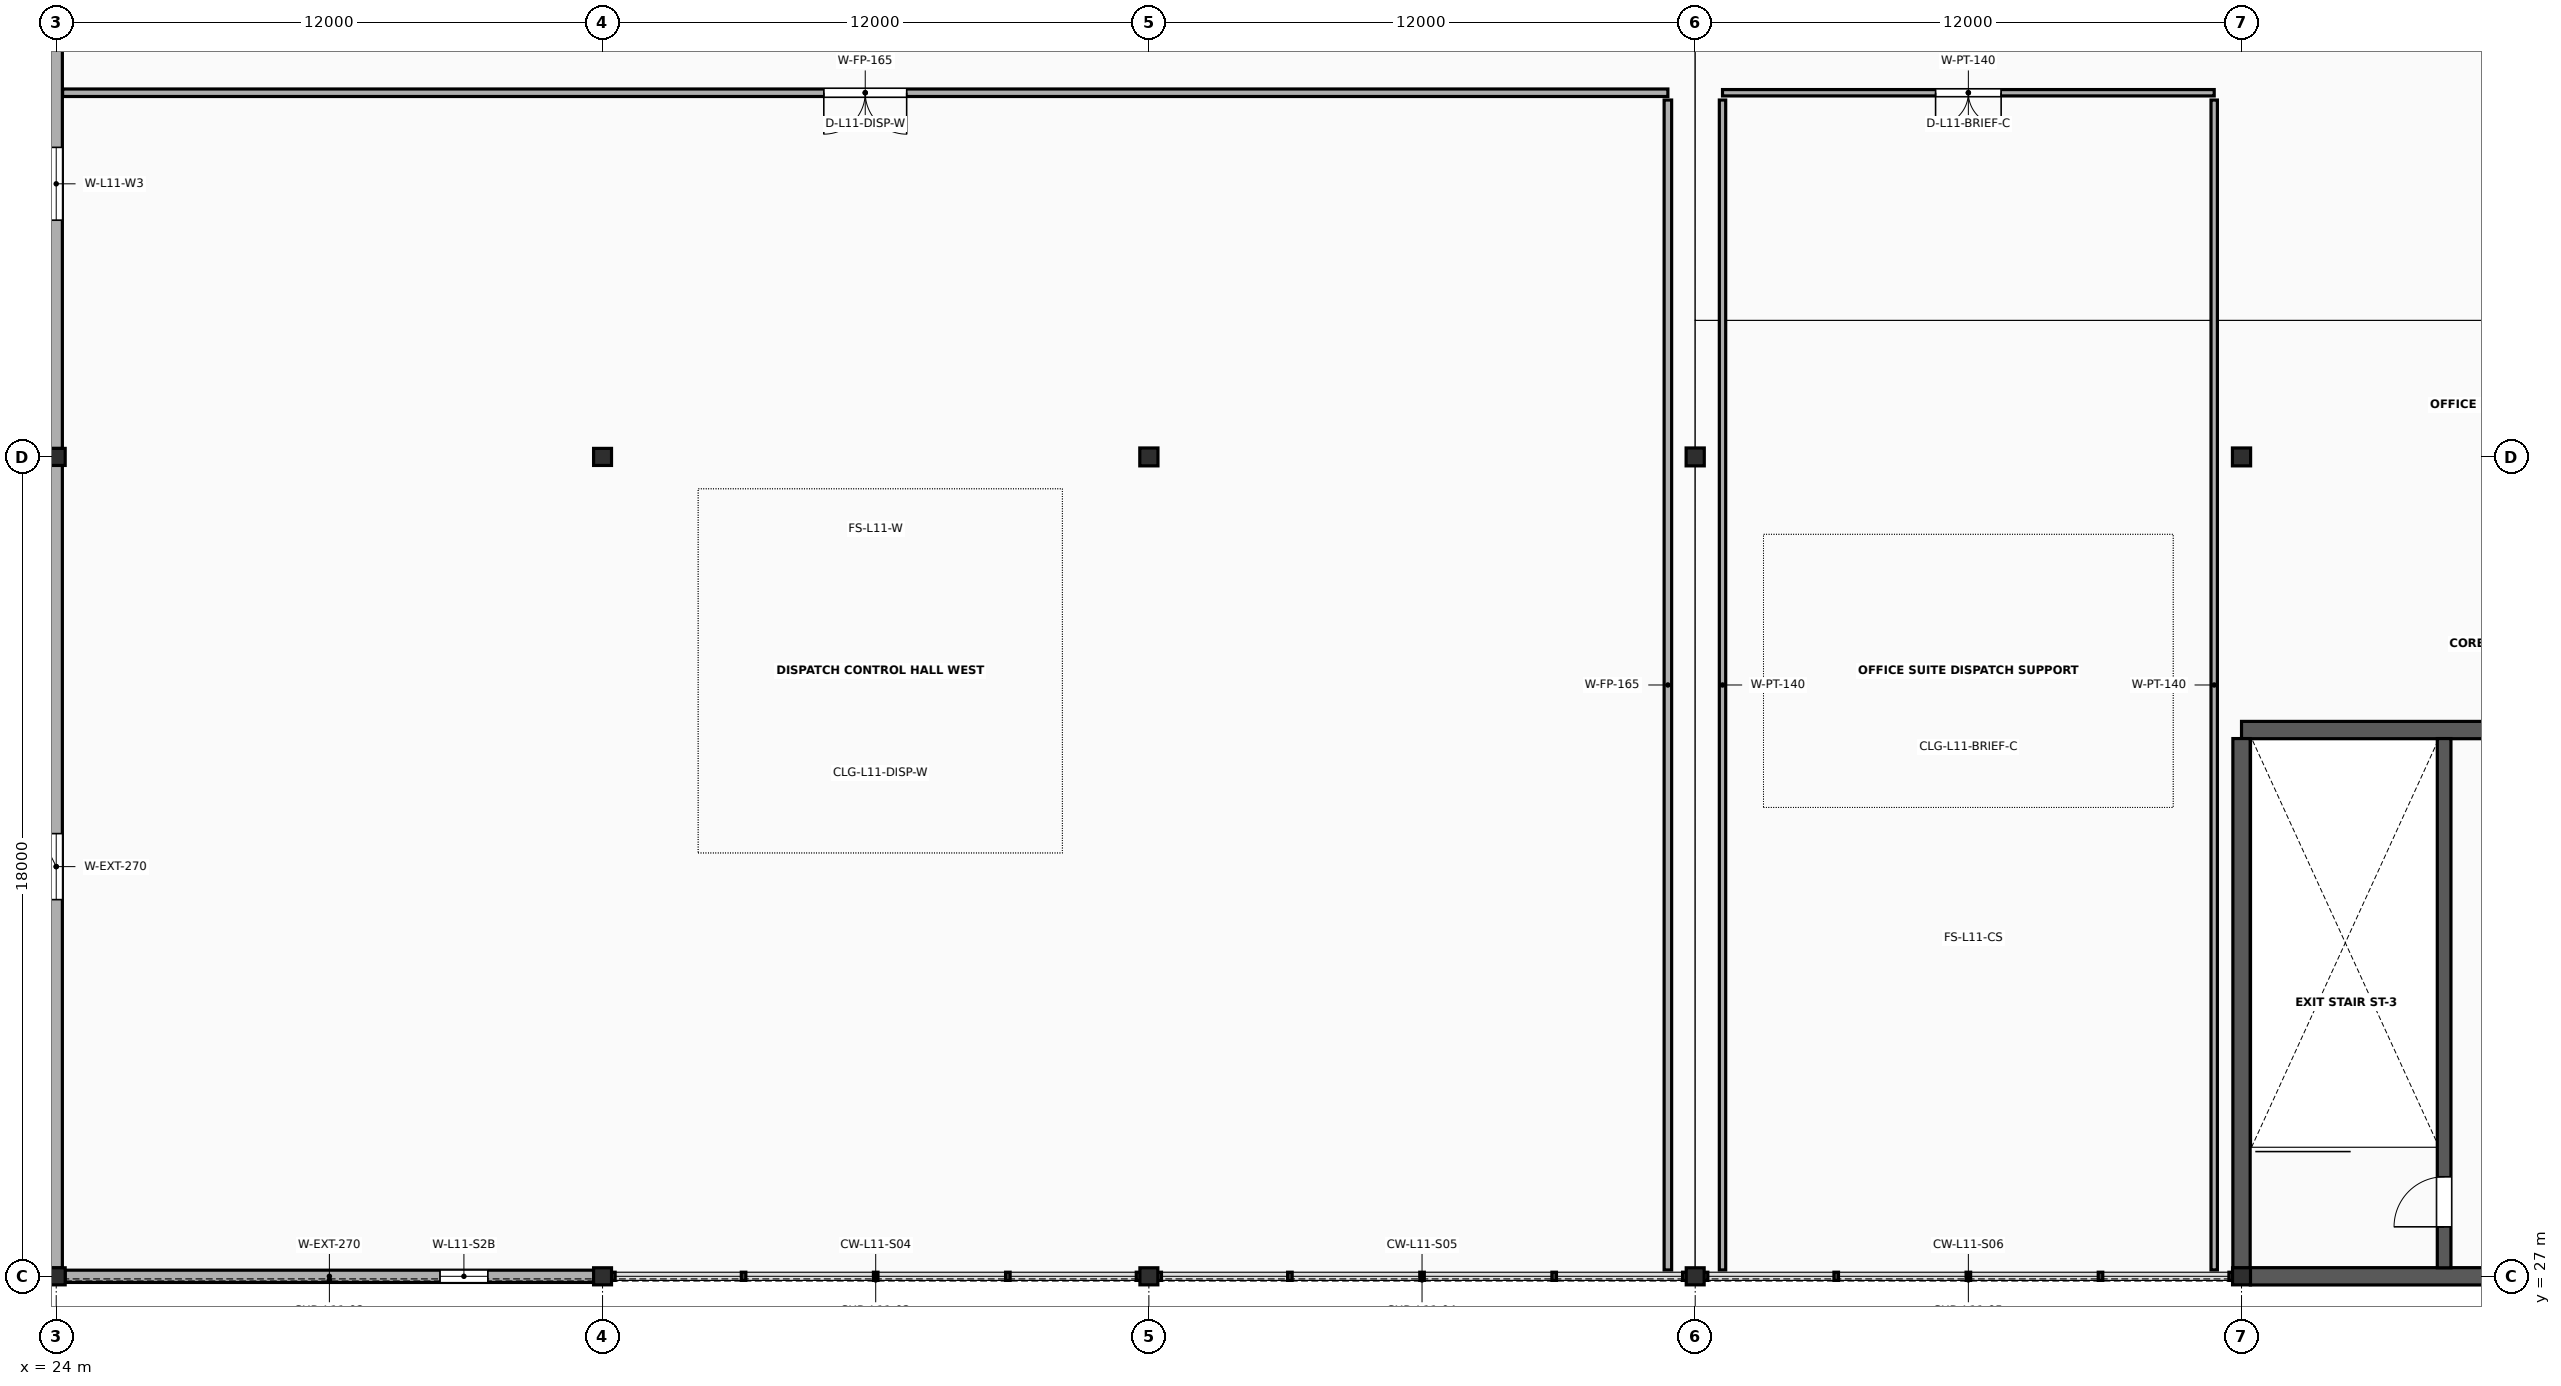
"""IFC4 building model, lengths in metres.
Left out: names, types, materials, properties, quantities, classifications, styles, units other than length and angle.
Written with IfcOpenShell. Run it as: python <this file> out.ifc"""

import sys

from ifc_helpers import new_model, si_unit, direction, frame, frame_2d, origin, origin_2d, place, context, subcontext, project, spatial, rectangle, i_section, extrude, element, fill, save


model = new_model("IFC4")
c1 = context("Model", 3, precision=1e-05, world=origin(), true_north=direction((0.0, 1.0)))
c2 = subcontext(c1, "Body", "Model", "MODEL_VIEW")
j1 = project(units=[si_unit("LENGTHUNIT", "METRE"), si_unit("PLANEANGLEUNIT", "RADIAN")], contexts=[c1])
p1 = place(None, origin())
s1 = spatial("IfcSite", under=j1, at=p1, CompositionType="ELEMENT")
p2 = place(p1, origin())
s2 = spatial("IfcBuilding", under=s1, at=p2, CompositionType="ELEMENT")
p3 = place(p2, frame((0.0, 0.0, 45.6)))
s3 = spatial("IfcBuildingStorey", under=s2, at=p3, CompositionType="ELEMENT", Elevation=45.6)
for number, where, z_axis, x_axis in (
    (1, (24.0, 27.0, 0.0), (0.0, 0.0, 1.0), (1.0, 0.0, 0.0)),
    (2, (24.0, 45.0, 0.0), (0.0, 0.0, 1.0), (1.0, 0.0, 0.0)),
    (3, (36.0, 27.0, 0.0), (0.0, 0.0, 1.0), (1.0, 0.0, 0.0)),
    (4, (36.0, 45.0, 0.0), (0.0, 0.0, 1.0), (1.0, 0.0, 0.0)),
    (5, (48.0, 27.0, 0.0), (0.0, 0.0, 1.0), (1.0, 0.0, 0.0)),
):
    element("IfcColumn", number, at=place(p3, frame(where, z_axis=z_axis, x_axis=x_axis)), inside=s3, PredefinedType="COLUMN", context=c2, shape_type="SweptSolid", body=[
        extrude(i_section(OverallWidth=0.394, OverallDepth=0.375, WebThickness=0.017, FlangeThickness=0.028, FilletRadius=0.018, at=origin_2d()), origin(), (0.0, 0.0, 1.0), 4.0),
    ])
p4 = place(p3, frame((48.0, 45.0, 0.0), z_axis=(0.0, 0.0, 1.0), x_axis=(1.0, 0.0, 0.0)))
e6 = element("IfcColumn", 6, at=p4, inside=s3, PredefinedType="COLUMN", context=c2, shape_type="SweptSolid", body=[
    extrude(i_section(OverallWidth=0.399, OverallDepth=0.393, WebThickness=0.023, FlangeThickness=0.037, FilletRadius=0.018, at=origin_2d()), origin(), (0.0, 0.0, 1.0), 4.0),
])
p5 = place(p3, frame((60.0, 27.0, 0.0), z_axis=(0.0, 0.0, 1.0), x_axis=(1.0, 0.0, 0.0)))
e7 = element("IfcColumn", 7, at=p5, inside=s3, PredefinedType="COLUMN", context=c2, shape_type="SweptSolid", body=[
    extrude(i_section(OverallWidth=0.394, OverallDepth=0.375, WebThickness=0.017, FlangeThickness=0.028, FilletRadius=0.018, at=origin_2d()), origin(), (0.0, 0.0, 1.0), 4.0),
])
p6 = place(p3, frame((60.0, 45.0, 0.0), z_axis=(0.0, 0.0, 1.0), x_axis=(1.0, 0.0, 0.0)))
e8 = element("IfcColumn", 8, at=p6, inside=s3, PredefinedType="COLUMN", context=c2, shape_type="SweptSolid", body=[
    extrude(i_section(OverallWidth=0.399, OverallDepth=0.393, WebThickness=0.023, FlangeThickness=0.037, FilletRadius=0.018, at=origin_2d()), origin(), (0.0, 0.0, 1.0), 4.0),
])
p7 = place(p3, frame((72.0, 27.0, 0.0), z_axis=(0.0, 0.0, 1.0), x_axis=(1.0, 0.0, 0.0)))
e9 = element("IfcColumn", 9, at=p7, inside=s3, PredefinedType="COLUMN", context=c2, shape_type="SweptSolid", body=[
    extrude(i_section(OverallWidth=0.394, OverallDepth=0.375, WebThickness=0.017, FlangeThickness=0.028, FilletRadius=0.018, at=origin_2d()), origin(), (0.0, 0.0, 1.0), 4.0),
])
p8 = place(p3, frame((72.0, 45.0, 0.0), z_axis=(0.0, 0.0, 1.0), x_axis=(1.0, 0.0, 0.0)))
e10 = element("IfcColumn", 10, at=p8, inside=s3, PredefinedType="COLUMN", context=c2, shape_type="SweptSolid", body=[
    extrude(i_section(OverallWidth=0.399, OverallDepth=0.393, WebThickness=0.023, FlangeThickness=0.037, FilletRadius=0.018, at=origin_2d()), origin(), (0.0, 0.0, 1.0), 4.0),
])
p9 = place(p3, frame((72.194, 27.0, 0.0), z_axis=(0.0, 0.0, 1.0), x_axis=(1.0, 0.0, 0.0)))
e11 = element("IfcWall", 11, at=p9, inside=s3, PredefinedType="SHEAR", context=c2, shape_type="SweptSolid", body=[
    extrude(rectangle(XDim=11.612, YDim=0.38, at=frame_2d((5.806, 0.0))), origin(), (0.0, 0.0, 1.0), 3.783),
])
p10 = place(p3, frame((72.0, 39.0, 0.0), z_axis=(0.0, 0.0, 1.0), x_axis=(1.0, 0.0, 0.0)))
e12 = element("IfcWall", 12, at=p10, inside=s3, PredefinedType="SHEAR", context=c2, shape_type="SweptSolid", body=[
    extrude(rectangle(XDim=12.0, YDim=0.38, at=frame_2d((6.0, 0.0))), origin(), (0.0, 0.0, 1.0), 3.783),
])
p11 = place(p10, frame((7.45, 0.0, 0.0)))
e13 = element("IfcOpeningElement", 13, at=p11, cuts=e12, PredefinedType="OPENING", context=c2, shape_type="SweptSolid", body=[
    extrude(rectangle(XDim=1.5, YDim=2.25, at=frame_2d((0.75, 1.125))), frame((0.0, 0.205, 0.0), z_axis=(0.0, -1.0, 0.0), x_axis=(1.0, 0.0, 0.0)), (0.0, 0.0, 1.0), 0.41),
])
p12 = place(p3, frame((72.0, 27.185, 0.0), z_axis=(0.0, 0.0, 1.0), x_axis=(0.0, 1.0, 0.0)))
e14 = element("IfcWall", 14, at=p12, inside=s3, PredefinedType="SHEAR", context=c2, shape_type="SweptSolid", body=[
    extrude(rectangle(XDim=11.628, YDim=0.38, at=frame_2d((5.814, 0.0))), origin(), (0.0, 0.0, 1.0), 3.783),
])
p13 = place(p3, frame((76.45, 27.187, 0.0), z_axis=(0.0, 0.0, 1.0), x_axis=(0.0, 1.0, 0.0)))
e15 = element("IfcWall", 15, at=p13, inside=s3, PredefinedType="SHEAR", context=c2, shape_type="SweptSolid", body=[
    extrude(rectangle(XDim=11.626, YDim=0.3, at=frame_2d((5.813, 0.0))), origin(), (0.0, 0.0, 1.0), 3.783),
])
p14 = place(p13, frame((0.9, 0.0, 0.0)))
e16 = element("IfcOpeningElement", 16, at=p14, cuts=e15, PredefinedType="OPENING", context=c2, shape_type="SweptSolid", body=[
    extrude(rectangle(XDim=1.1, YDim=2.2, at=frame_2d((0.55, 1.1))), frame((0.0, 0.165, 0.0), z_axis=(0.0, -1.0, 0.0), x_axis=(1.0, 0.0, 0.0)), (0.0, 0.0, 1.0), 0.33),
])
p15 = place(p3, frame((24.195, 27.0, 0.0), z_axis=(0.0, 0.0, 1.0), x_axis=(1.0, 0.0, 0.0)))
e17 = element("IfcWall", 17, at=p15, inside=s3, PredefinedType="SOLIDWALL", context=c2, shape_type="SweptSolid", body=[
    extrude(rectangle(XDim=11.61, YDim=0.27, at=frame_2d((5.805, 0.0))), origin(), (0.0, 0.0, 1.0), 3.236),
])
p16 = place(p15, frame((8.235, 0.0, 0.78)))
e18 = element("IfcOpeningElement", 18, at=p16, cuts=e17, PredefinedType="OPENING", context=c2, shape_type="SweptSolid", body=[
    extrude(rectangle(XDim=1.05, YDim=1.25, at=frame_2d((0.525, 0.625))), frame((0.0, 0.15, 0.0), z_axis=(0.0, -1.0, 0.0), x_axis=(1.0, 0.0, 0.0)), (0.0, 0.0, 1.0), 0.3),
])
p17 = place(p3, frame((24.0, 27.186, 0.0), z_axis=(0.0, 0.0, 1.0), x_axis=(0.0, 1.0, 0.0)))
e19 = element("IfcWall", 19, at=p17, inside=s3, PredefinedType="SOLIDWALL", context=c2, shape_type="SweptSolid", body=[
    extrude(rectangle(XDim=17.629, YDim=0.27, at=frame_2d((8.814, 0.0))), origin(), (0.0, 0.0, 1.0), 3.236),
])
p18 = place(p17, frame((8.09, 0.0, 0.78)))
e20 = element("IfcOpeningElement", 20, at=p18, cuts=e19, PredefinedType="OPENING", context=c2, shape_type="SweptSolid", body=[
    extrude(rectangle(XDim=1.45, YDim=1.25, at=frame_2d((0.725, 0.625))), frame((0.0, 0.15, 0.0), z_axis=(0.0, -1.0, 0.0), x_axis=(1.0, 0.0, 0.0)), (0.0, 0.0, 1.0), 0.3),
])
p19 = place(p3, frame((24.0, 45.186, 0.0), z_axis=(0.0, 0.0, 1.0), x_axis=(0.0, 1.0, 0.0)))
e21 = element("IfcWall", 21, at=p19, inside=s3, PredefinedType="SOLIDWALL", context=c2, shape_type="SweptSolid", body=[
    extrude(rectangle(XDim=11.629, YDim=0.27, at=frame_2d((5.814, 0.0))), origin(), (0.0, 0.0, 1.0), 3.236),
])
p20 = place(p19, frame((5.014, 0.0, 0.78)))
e22 = element("IfcOpeningElement", 22, at=p20, cuts=e21, PredefinedType="OPENING", context=c2, shape_type="SweptSolid", body=[
    extrude(rectangle(XDim=1.6, YDim=1.25, at=frame_2d((0.8, 0.625))), frame((0.0, 0.15, 0.0), z_axis=(0.0, -1.0, 0.0), x_axis=(1.0, 0.0, 0.0)), (0.0, 0.0, 1.0), 0.3),
])
p21 = place(p3, frame((24.14, 53.0, 0.0), z_axis=(0.0, 0.0, 1.0), x_axis=(1.0, 0.0, 0.0)))
e23 = element("IfcWall", 23, at=p21, inside=s3, PredefinedType="PARTITIONING", context=c2, shape_type="SweptSolid", body=[
    extrude(rectangle(XDim=35.26, YDim=0.165, at=frame_2d((17.63, 0.0))), origin(), (0.0, 0.0, 1.0), 2.88),
])
p22 = place(p21, frame((16.72, 0.0, 0.0)))
e24 = element("IfcOpeningElement", 24, at=p22, cuts=e23, PredefinedType="OPENING", context=c2, shape_type="SweptSolid", body=[
    extrude(rectangle(XDim=1.82, YDim=2.36, at=frame_2d((0.91, 1.18))), frame((0.0, 0.097, 0.0), z_axis=(0.0, -1.0, 0.0), x_axis=(1.0, 0.0, 0.0)), (0.0, 0.0, 1.0), 0.195),
])
p23 = place(p3, frame((59.4, 27.14, 0.0), z_axis=(0.0, 0.0, 1.0), x_axis=(0.0, 1.0, 0.0)))
e25 = element("IfcWall", 25, at=p23, inside=s3, PredefinedType="PARTITIONING", context=c2, shape_type="SweptSolid", body=[
    extrude(rectangle(XDim=25.7, YDim=0.165, at=frame_2d((12.85, 0.0))), origin(), (0.0, 0.0, 1.0), 2.88),
])
p24 = place(p3, frame((60.6, 53.0, 0.0), z_axis=(0.0, 0.0, 1.0), x_axis=(1.0, 0.0, 0.0)))
e26 = element("IfcWall", 26, at=p24, inside=s3, PredefinedType="PARTITIONING", context=c2, shape_type="SweptSolid", body=[
    extrude(rectangle(XDim=10.8, YDim=0.14, at=frame_2d((5.4, 0.0))), origin(), (0.0, 0.0, 1.0), 2.88),
])
p25 = place(p24, frame((4.68, 0.0, 0.0)))
e27 = element("IfcOpeningElement", 27, at=p25, cuts=e26, PredefinedType="OPENING", context=c2, shape_type="SweptSolid", body=[
    extrude(rectangle(XDim=1.44, YDim=2.26, at=frame_2d((0.72, 1.13))), frame((0.0, 0.085, 0.0), z_axis=(0.0, -1.0, 0.0), x_axis=(1.0, 0.0, 0.0)), (0.0, 0.0, 1.0), 0.17),
])
for number, where, z_axis, x_axis in (
    (28, (60.6, 27.14, 0.0), (0.0, 0.0, 1.0), (0.0, 1.0, 0.0)),
    (29, (71.4, 27.14, 0.0), (0.0, 0.0, 1.0), (0.0, 1.0, 0.0)),
):
    element("IfcWall", number, at=place(p3, frame(where, z_axis=z_axis, x_axis=x_axis)), inside=s3, PredefinedType="PARTITIONING", context=c2, shape_type="SweptSolid", body=[
        extrude(rectangle(XDim=25.7, YDim=0.14, at=frame_2d((12.85, 0.0))), origin(), (0.0, 0.0, 1.0), 2.88),
    ])
p26 = place(p16, origin())
e30 = element("IfcWindow", 30, at=p26, inside=s3, PartitioningType="SINGLE_PANEL", PredefinedType="WINDOW", context=c2, shape_type="SweptSolid", body=[
    extrude(rectangle(XDim=1.05, YDim=1.25, at=frame_2d((0.525, 0.625))), frame((0.0, 0.03, 0.0), z_axis=(0.0, -1.0, 0.0), x_axis=(1.0, 0.0, 0.0)), (0.0, 0.0, 1.0), 0.06),
])
fill(e18, e30)
p27 = place(p18, origin())
e31 = element("IfcWindow", 31, at=p27, inside=s3, PartitioningType="SINGLE_PANEL", PredefinedType="WINDOW", context=c2, shape_type="SweptSolid", body=[
    extrude(rectangle(XDim=1.45, YDim=1.25, at=frame_2d((0.725, 0.625))), frame((0.0, 0.03, 0.0), z_axis=(0.0, -1.0, 0.0), x_axis=(1.0, 0.0, 0.0)), (0.0, 0.0, 1.0), 0.06),
])
fill(e20, e31)
p28 = place(p20, origin())
e32 = element("IfcWindow", 32, at=p28, inside=s3, PartitioningType="SINGLE_PANEL", PredefinedType="WINDOW", context=c2, shape_type="SweptSolid", body=[
    extrude(rectangle(XDim=1.6, YDim=1.25, at=frame_2d((0.8, 0.625))), frame((0.0, 0.03, 0.0), z_axis=(0.0, -1.0, 0.0), x_axis=(1.0, 0.0, 0.0)), (0.0, 0.0, 1.0), 0.06),
])
fill(e22, e32)
p29 = place(p14, origin())
e33 = element("IfcDoor", 33, at=p29, inside=s3, OperationType="SINGLE_SWING_LEFT", PredefinedType="DOOR", context=c2, shape_type="SweptSolid", body=[
    extrude(rectangle(XDim=1.1, YDim=2.2, at=frame_2d((0.55, 1.1))), frame((0.0, 0.025, 0.0), z_axis=(0.0, -1.0, 0.0), x_axis=(1.0, 0.0, 0.0)), (0.0, 0.0, 1.0), 0.05),
])
fill(e16, e33)
p30 = place(p22, origin())
e34 = element("IfcDoor", 34, at=p30, inside=s3, OperationType="DOUBLE_DOOR_SINGLE_SWING", PredefinedType="DOOR", context=c2, shape_type="SweptSolid", body=[
    extrude(rectangle(XDim=1.82, YDim=2.36, at=frame_2d((0.91, 1.18))), frame((0.0, 0.025, 0.0), z_axis=(0.0, -1.0, 0.0), x_axis=(1.0, 0.0, 0.0)), (0.0, 0.0, 1.0), 0.05),
])
fill(e24, e34)
p31 = place(p25, origin())
e35 = element("IfcDoor", 35, at=p31, inside=s3, OperationType="DOUBLE_DOOR_SINGLE_SWING", PredefinedType="DOOR", context=c2, shape_type="SweptSolid", body=[
    extrude(rectangle(XDim=1.44, YDim=2.26, at=frame_2d((0.72, 1.13))), frame((0.0, 0.025, 0.0), z_axis=(0.0, -1.0, 0.0), x_axis=(1.0, 0.0, 0.0)), (0.0, 0.0, 1.0), 0.05),
])
fill(e27, e35)
save(model, sys.argv[1])
